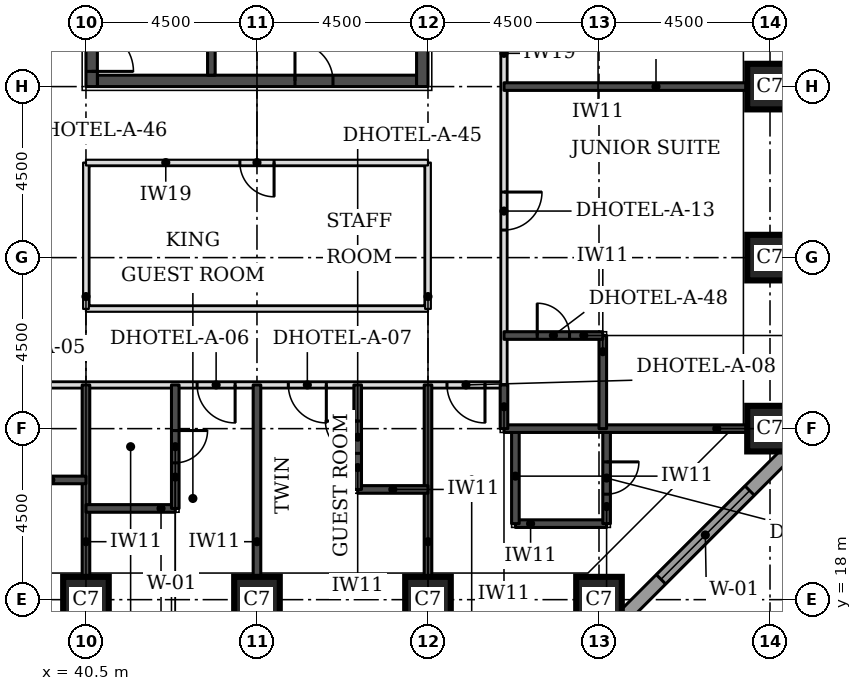
"""IFC4 building model, lengths in metres.
Left out: names, types, materials, properties, quantities, classifications, styles, units other than length and angle.
Written with IfcOpenShell. Run it as: python <this file> out.ifc"""

import sys

from ifc_helpers import new_model, si_unit, direction, frame, frame_2d, origin, origin_2d, place, context, subcontext, project, spatial, rectangle, extrude, element, fill, save


model = new_model("IFC4")
c1 = context("Model", 3, precision=1e-05, world=origin(), true_north=direction((0.0, 1.0)))
c2 = subcontext(c1, "Body", "Model", "MODEL_VIEW")
j1 = project(units=[si_unit("LENGTHUNIT", "METRE"), si_unit("PLANEANGLEUNIT", "RADIAN")], contexts=[c1])
p1 = place(None, origin())
s1 = spatial("IfcSite", under=j1, at=p1, CompositionType="ELEMENT")
p2 = place(p1, origin())
s2 = spatial("IfcBuilding", under=s1, at=p2, CompositionType="ELEMENT")
p3 = place(p2, frame((0.0, 0.0, 49.5)))
s3 = spatial("IfcBuildingStorey", under=s2, at=p3, CompositionType="ELEMENT", Elevation=49.5)
for number, where, z_axis, x_axis in (
    (1, (40.5, 18.0, 0.0), (0.0, 0.0, 1.0), (1.0, 0.0, 0.0)),
    (2, (45.0, 18.0, 0.0), (0.0, 0.0, 1.0), (1.0, 0.0, 0.0)),
    (3, (49.5, 18.0, 0.0), (0.0, 0.0, 1.0), (1.0, 0.0, 0.0)),
    (4, (54.0, 18.0, 0.0), (0.0, 0.0, 1.0), (1.0, 0.0, 0.0)),
    (5, (58.5, 22.5, 0.0), (0.0, 0.0, 1.0), (1.0, 0.0, 0.0)),
    (6, (58.5, 27.0, 0.0), (0.0, 0.0, 1.0), (1.0, 0.0, 0.0)),
    (7, (58.5, 31.5, 0.0), (0.0, 0.0, 1.0), (1.0, 0.0, 0.0)),
):
    element("IfcColumn", number, at=place(p3, frame(where, z_axis=z_axis, x_axis=x_axis)), inside=s3, PredefinedType="COLUMN", context=c2, shape_type="SweptSolid", body=[
        extrude(rectangle(XDim=1.2, YDim=1.2, at=origin_2d()), origin(), (0.0, 0.0, 1.0), 3.3),
    ])
p4 = place(p3, frame((40.8, 31.65, 0.0), z_axis=(0.0, 0.0, 1.0), x_axis=(1.0, 0.0, 0.0)))
e8 = element("IfcWall", 8, at=p4, inside=s3, PredefinedType="SHEAR", context=c2, shape_type="SweptSolid", body=[
    extrude(rectangle(XDim=8.4, YDim=0.3, at=frame_2d((4.2, 0.0))), origin(), (0.0, 0.0, 1.0), 3.3),
])
p5 = place(p4, frame((5.2, 0.0, 0.0)))
e9 = element("IfcOpeningElement", 9, at=p5, cuts=e8, PredefinedType="OPENING", context=c2, shape_type="SweptSolid", body=[
    extrude(rectangle(XDim=1.0, YDim=2.1, at=frame_2d((0.5, 1.05))), frame((0.0, 0.16, 0.0), z_axis=(0.0, -1.0, 0.0), x_axis=(1.0, 0.0, 0.0)), (0.0, 0.0, 1.0), 0.32),
])
p6 = place(p3, frame((40.65, 31.5, 0.0), z_axis=(0.0, 0.0, 1.0), x_axis=(0.0, 1.0, 0.0)))
e10 = element("IfcWall", 10, at=p6, inside=s3, PredefinedType="SHEAR", context=c2, shape_type="SweptSolid", body=[
    extrude(rectangle(XDim=9.0, YDim=0.3, at=frame_2d((4.5, 0.0))), origin(), (0.0, 0.0, 1.0), 3.3),
])
p7 = place(p6, frame((0.4, 0.0, 0.0)))
e11 = element("IfcOpeningElement", 11, at=p7, cuts=e10, PredefinedType="OPENING", context=c2, shape_type="SweptSolid", body=[
    extrude(rectangle(XDim=1.1, YDim=2.1, at=frame_2d((0.55, 1.05))), frame((0.0, 0.16, 0.0), z_axis=(0.0, -1.0, 0.0), x_axis=(1.0, 0.0, 0.0)), (0.0, 0.0, 1.0), 0.32),
])
p8 = place(p3, frame((49.35, 31.5, 0.0), z_axis=(0.0, 0.0, 1.0), x_axis=(0.0, 1.0, 0.0)))
e12 = element("IfcWall", 12, at=p8, inside=s3, PredefinedType="SHEAR", context=c2, shape_type="SweptSolid", body=[
    extrude(rectangle(XDim=9.0, YDim=0.3, at=frame_2d((4.5, 0.0))), origin(), (0.0, 0.0, 1.0), 3.3),
])
p9 = place(p3, frame((54.27, 17.174, 0.0), z_axis=(0.0, 0.0, 1.0), x_axis=(0.707106781187, 0.707106781187, 0.0)))
e13 = element("IfcWall", 13, at=p9, inside=s3, PredefinedType="STANDARD", context=c2, shape_type="SweptSolid", body=[
    extrude(rectangle(XDim=7.151, YDim=0.35, at=frame_2d((3.576, 0.0))), origin(), (0.0, 0.0, 1.0), 3.055),
])
p10 = place(p9, frame((1.926, 0.0, 0.8)))
e14 = element("IfcOpeningElement", 14, at=p10, cuts=e13, PredefinedType="OPENING", context=c2, shape_type="SweptSolid", body=[
    extrude(rectangle(XDim=3.3, YDim=1.5, at=frame_2d((1.65, 0.75))), frame((0.0, 0.185, 0.0), z_axis=(0.0, -1.0, 0.0), x_axis=(1.0, 0.0, 0.0)), (0.0, 0.0, 1.0), 0.37),
])
p11 = place(p3, frame((19.15, 23.65, 0.0), z_axis=(0.0, 0.0, 1.0), x_axis=(1.0, 0.0, 0.0)))
e15 = element("IfcWall", 15, at=p11, inside=s3, PredefinedType="PARTITIONING", context=c2, shape_type="SweptSolid", body=[
    extrude(rectangle(XDim=32.35, YDim=0.15, at=frame_2d((16.175, 0.0))), origin(), (0.0, 0.0, 1.0), 3.08),
])
p12 = place(p11, frame((6.275, 0.0, 0.0)))
e16 = element("IfcOpeningElement", 16, at=p12, cuts=e15, PredefinedType="OPENING", context=c2, shape_type="SweptSolid", body=[
    extrude(rectangle(XDim=1.0, YDim=2.1, at=frame_2d((0.5, 1.05))), frame((0.0, 0.085, 0.0), z_axis=(0.0, -1.0, 0.0), x_axis=(1.0, 0.0, 0.0)), (0.0, 0.0, 1.0), 0.17),
])
p13 = place(p11, frame((8.675, 0.0, 0.0)))
e17 = element("IfcOpeningElement", 17, at=p13, cuts=e15, PredefinedType="OPENING", context=c2, shape_type="SweptSolid", body=[
    extrude(rectangle(XDim=1.0, YDim=2.1, at=frame_2d((0.5, 1.05))), frame((0.0, 0.085, 0.0), z_axis=(0.0, -1.0, 0.0), x_axis=(1.0, 0.0, 0.0)), (0.0, 0.0, 1.0), 0.17),
])
p14 = place(p11, frame((15.25, 0.0, 0.0)))
e18 = element("IfcOpeningElement", 18, at=p14, cuts=e15, PredefinedType="OPENING", context=c2, shape_type="SweptSolid", body=[
    extrude(rectangle(XDim=1.0, YDim=2.1, at=frame_2d((0.5, 1.05))), frame((0.0, 0.085, 0.0), z_axis=(0.0, -1.0, 0.0), x_axis=(1.0, 0.0, 0.0)), (0.0, 0.0, 1.0), 0.17),
])
p15 = place(p11, frame((17.675, 0.0, 0.0)))
e19 = element("IfcOpeningElement", 19, at=p15, cuts=e15, PredefinedType="OPENING", context=c2, shape_type="SweptSolid", body=[
    extrude(rectangle(XDim=1.0, YDim=2.1, at=frame_2d((0.5, 1.05))), frame((0.0, 0.085, 0.0), z_axis=(0.0, -1.0, 0.0), x_axis=(1.0, 0.0, 0.0)), (0.0, 0.0, 1.0), 0.17),
])
p16 = place(p11, frame((24.275, 0.0, 0.0)))
e20 = element("IfcOpeningElement", 20, at=p16, cuts=e15, PredefinedType="OPENING", context=c2, shape_type="SweptSolid", body=[
    extrude(rectangle(XDim=1.0, YDim=2.1, at=frame_2d((0.5, 1.05))), frame((0.0, 0.085, 0.0), z_axis=(0.0, -1.0, 0.0), x_axis=(1.0, 0.0, 0.0)), (0.0, 0.0, 1.0), 0.17),
])
p17 = place(p11, frame((26.675, 0.0, 0.0)))
e21 = element("IfcOpeningElement", 21, at=p17, cuts=e15, PredefinedType="OPENING", context=c2, shape_type="SweptSolid", body=[
    extrude(rectangle(XDim=1.0, YDim=2.1, at=frame_2d((0.5, 1.05))), frame((0.0, 0.085, 0.0), z_axis=(0.0, -1.0, 0.0), x_axis=(1.0, 0.0, 0.0)), (0.0, 0.0, 1.0), 0.17),
])
p18 = place(p11, frame((1.175, 0.0, 0.0)))
e22 = element("IfcOpeningElement", 22, at=p18, cuts=e15, PredefinedType="OPENING", context=c2, shape_type="SweptSolid", body=[
    extrude(rectangle(XDim=1.0, YDim=2.1, at=frame_2d((0.5, 1.05))), frame((0.0, 0.085, 0.0), z_axis=(0.0, -1.0, 0.0), x_axis=(1.0, 0.0, 0.0)), (0.0, 0.0, 1.0), 0.17),
])
p19 = place(p11, frame((30.85, 0.0, 0.0)))
e23 = element("IfcOpeningElement", 23, at=p19, cuts=e15, PredefinedType="OPENING", context=c2, shape_type="SweptSolid", body=[
    extrude(rectangle(XDim=1.0, YDim=2.1, at=frame_2d((0.5, 1.05))), frame((0.0, 0.085, 0.0), z_axis=(0.0, -1.0, 0.0), x_axis=(1.0, 0.0, 0.0)), (0.0, 0.0, 1.0), 0.17),
])
p20 = place(p3, frame((51.5, 23.65, 0.0), z_axis=(0.0, 0.0, 1.0), x_axis=(0.0, 1.0, 0.0)))
e24 = element("IfcWall", 24, at=p20, inside=s3, PredefinedType="PARTITIONING", context=c2, shape_type="SweptSolid", body=[
    extrude(rectangle(XDim=23.85, YDim=0.15, at=frame_2d((11.925, 0.0))), origin(), (0.0, 0.0, 1.0), 3.08),
])
p21 = place(p20, frame((4.075, 0.0, 0.0)))
e25 = element("IfcOpeningElement", 25, at=p21, cuts=e24, PredefinedType="OPENING", context=c2, shape_type="SweptSolid", body=[
    extrude(rectangle(XDim=1.0, YDim=2.1, at=frame_2d((0.5, 1.05))), frame((0.0, 0.085, 0.0), z_axis=(0.0, -1.0, 0.0), x_axis=(1.0, 0.0, 0.0)), (0.0, 0.0, 1.0), 0.17),
])
p22 = place(p20, frame((10.375, 0.0, 0.0)))
e26 = element("IfcOpeningElement", 26, at=p22, cuts=e24, PredefinedType="OPENING", context=c2, shape_type="SweptSolid", body=[
    extrude(rectangle(XDim=1.0, YDim=2.1, at=frame_2d((0.5, 1.05))), frame((0.0, 0.085, 0.0), z_axis=(0.0, -1.0, 0.0), x_axis=(1.0, 0.0, 0.0)), (0.0, 0.0, 1.0), 0.17),
])
p23 = place(p20, frame((19.9, 0.0, 0.0)))
e27 = element("IfcOpeningElement", 27, at=p23, cuts=e24, PredefinedType="OPENING", context=c2, shape_type="SweptSolid", body=[
    extrude(rectangle(XDim=0.9, YDim=2.1, at=frame_2d((0.45, 1.05))), frame((0.0, 0.085, 0.0), z_axis=(0.0, -1.0, 0.0), x_axis=(1.0, 0.0, 0.0)), (0.0, 0.0, 1.0), 0.17),
])
p24 = place(p3, frame((40.5, 25.65, 0.0), z_axis=(0.0, 0.0, 1.0), x_axis=(1.0, 0.0, 0.0)))
e28 = element("IfcWall", 28, at=p24, inside=s3, PredefinedType="PARTITIONING", context=c2, shape_type="SweptSolid", body=[
    extrude(rectangle(XDim=9.0, YDim=0.15, at=frame_2d((4.5, 0.0))), origin(), (0.0, 0.0, 1.0), 3.08),
])
for number, where, z_axis, x_axis in (
    (29, (40.5, 25.65, 0.0), (0.0, 0.0, 1.0), (0.0, 1.0, 0.0)),
    (30, (49.5, 25.65, 0.0), (0.0, 0.0, 1.0), (0.0, 1.0, 0.0)),
):
    element("IfcWall", number, at=place(p3, frame(where, z_axis=z_axis, x_axis=x_axis)), inside=s3, PredefinedType="PARTITIONING", context=c2, shape_type="SweptSolid", body=[
        extrude(rectangle(XDim=3.85, YDim=0.15, at=frame_2d((1.925, 0.0))), origin(), (0.0, 0.0, 1.0), 3.08),
    ])
p25 = place(p3, frame((40.5, 29.5, 0.0), z_axis=(0.0, 0.0, 1.0), x_axis=(1.0, 0.0, 0.0)))
e31 = element("IfcWall", 31, at=p25, inside=s3, PredefinedType="PARTITIONING", context=c2, shape_type="SweptSolid", body=[
    extrude(rectangle(XDim=9.0, YDim=0.15, at=frame_2d((4.5, 0.0))), origin(), (0.0, 0.0, 1.0), 3.08),
])
p26 = place(p25, frame((4.05, 0.0, 0.0)))
e32 = element("IfcOpeningElement", 32, at=p26, cuts=e31, PredefinedType="OPENING", context=c2, shape_type="SweptSolid", body=[
    extrude(rectangle(XDim=0.9, YDim=2.1, at=frame_2d((0.45, 1.05))), frame((0.0, 0.085, 0.0), z_axis=(0.0, -1.0, 0.0), x_axis=(1.0, 0.0, 0.0)), (0.0, 0.0, 1.0), 0.17),
])
for number, where, z_axis, x_axis in (
    (33, (40.5, 18.6, 0.0), (0.0, 0.0, 1.0), (0.0, 1.0, 0.0)),
    (34, (45.0, 18.6, 0.0), (0.0, 0.0, 1.0), (0.0, 1.0, 0.0)),
    (35, (49.5, 18.6, 0.0), (0.0, 0.0, 1.0), (0.0, 1.0, 0.0)),
):
    element("IfcWall", number, at=place(p3, frame(where, z_axis=z_axis, x_axis=x_axis)), inside=s3, PredefinedType="SOLIDWALL", context=c2, shape_type="SweptSolid", body=[
        extrude(rectangle(XDim=5.05, YDim=0.2, at=frame_2d((2.525, 0.0))), origin(), (0.0, 0.0, 1.0), 3.08),
    ])
p27 = place(p3, frame((51.8, 20.0, 0.0), z_axis=(0.0, 0.0, 1.0), x_axis=(1.0, 0.0, 0.0)))
e36 = element("IfcWall", 36, at=p27, inside=s3, PredefinedType="SOLIDWALL", context=c2, shape_type="SweptSolid", body=[
    extrude(rectangle(XDim=2.4, YDim=0.2, at=frame_2d((1.2, 0.0))), origin(), (0.0, 0.0, 1.0), 3.08),
])
p28 = place(p3, frame((51.8, 20.0, 0.0), z_axis=(0.0, 0.0, 1.0), x_axis=(0.0, 1.0, 0.0)))
e37 = element("IfcWall", 37, at=p28, inside=s3, PredefinedType="SOLIDWALL", context=c2, shape_type="SweptSolid", body=[
    extrude(rectangle(XDim=2.5, YDim=0.2, at=frame_2d((1.25, 0.0))), origin(), (0.0, 0.0, 1.0), 3.08),
])
p29 = place(p3, frame((54.2, 20.0, 0.0), z_axis=(0.0, 0.0, 1.0), x_axis=(0.0, 1.0, 0.0)))
e38 = element("IfcWall", 38, at=p29, inside=s3, PredefinedType="SOLIDWALL", context=c2, shape_type="SweptSolid", body=[
    extrude(rectangle(XDim=2.5, YDim=0.2, at=frame_2d((1.25, 0.0))), origin(), (0.0, 0.0, 1.0), 3.08),
])
p30 = place(p29, frame((0.775, 0.0, 0.0)))
e39 = element("IfcOpeningElement", 39, at=p30, cuts=e38, PredefinedType="OPENING", context=c2, shape_type="SweptSolid", body=[
    extrude(rectangle(XDim=0.85, YDim=2.1, at=frame_2d((0.425, 1.05))), frame((0.0, 0.11, 0.0), z_axis=(0.0, -1.0, 0.0), x_axis=(1.0, 0.0, 0.0)), (0.0, 0.0, 1.0), 0.22),
])
p31 = place(p3, frame((40.5, 20.4, 0.0), z_axis=(0.0, 0.0, 1.0), x_axis=(1.0, 0.0, 0.0)))
e40 = element("IfcWall", 40, at=p31, inside=s3, PredefinedType="SOLIDWALL", context=c2, shape_type="SweptSolid", body=[
    extrude(rectangle(XDim=2.35, YDim=0.2, at=frame_2d((1.175, 0.0))), origin(), (0.0, 0.0, 1.0), 3.08),
])
p32 = place(p3, frame((42.85, 20.4, 0.0), z_axis=(0.0, 0.0, 1.0), x_axis=(0.0, 1.0, 0.0)))
e41 = element("IfcWall", 41, at=p32, inside=s3, PredefinedType="SOLIDWALL", context=c2, shape_type="SweptSolid", body=[
    extrude(rectangle(XDim=3.25, YDim=0.2, at=frame_2d((1.625, 0.0))), origin(), (0.0, 0.0, 1.0), 3.08),
])
p33 = place(p32, frame((1.2, 0.0, 0.0)))
e42 = element("IfcOpeningElement", 42, at=p33, cuts=e41, PredefinedType="OPENING", context=c2, shape_type="SweptSolid", body=[
    extrude(rectangle(XDim=0.85, YDim=2.1, at=frame_2d((0.425, 1.05))), frame((0.0, 0.11, 0.0), z_axis=(0.0, -1.0, 0.0), x_axis=(1.0, 0.0, 0.0)), (0.0, 0.0, 1.0), 0.22),
])
p34 = place(p3, frame((47.65, 20.9, 0.0), z_axis=(0.0, 0.0, 1.0), x_axis=(1.0, 0.0, 0.0)))
e43 = element("IfcWall", 43, at=p34, inside=s3, PredefinedType="SOLIDWALL", context=c2, shape_type="SweptSolid", body=[
    extrude(rectangle(XDim=1.85, YDim=0.2, at=frame_2d((0.925, 0.0))), origin(), (0.0, 0.0, 1.0), 3.08),
])
p35 = place(p3, frame((47.65, 20.9, 0.0), z_axis=(0.0, 0.0, 1.0), x_axis=(0.0, 1.0, 0.0)))
e44 = element("IfcWall", 44, at=p35, inside=s3, PredefinedType="SOLIDWALL", context=c2, shape_type="SweptSolid", body=[
    extrude(rectangle(XDim=2.75, YDim=0.2, at=frame_2d((1.375, 0.0))), origin(), (0.0, 0.0, 1.0), 3.08),
])
p36 = place(p35, frame((0.95, 0.0, 0.0)))
e45 = element("IfcOpeningElement", 45, at=p36, cuts=e44, PredefinedType="OPENING", context=c2, shape_type="SweptSolid", body=[
    extrude(rectangle(XDim=0.85, YDim=2.1, at=frame_2d((0.425, 1.05))), frame((0.0, 0.11, 0.0), z_axis=(0.0, -1.0, 0.0), x_axis=(1.0, 0.0, 0.0)), (0.0, 0.0, 1.0), 0.22),
])
p37 = place(p3, frame((38.65, 21.15, 0.0), z_axis=(0.0, 0.0, 1.0), x_axis=(1.0, 0.0, 0.0)))
e46 = element("IfcWall", 46, at=p37, inside=s3, PredefinedType="SOLIDWALL", context=c2, shape_type="SweptSolid", body=[
    extrude(rectangle(XDim=1.85, YDim=0.2, at=frame_2d((0.925, 0.0))), origin(), (0.0, 0.0, 1.0), 3.08),
])
p38 = place(p3, frame((51.5, 22.5, 0.0), z_axis=(0.0, 0.0, 1.0), x_axis=(1.0, 0.0, 0.0)))
e47 = element("IfcWall", 47, at=p38, inside=s3, PredefinedType="SOLIDWALL", context=c2, shape_type="SweptSolid", body=[
    extrude(rectangle(XDim=6.4, YDim=0.2, at=frame_2d((3.2, 0.0))), origin(), (0.0, 0.0, 1.0), 3.08),
])
p39 = place(p3, frame((51.5, 22.5, 0.0), z_axis=(0.0, 0.0, 1.0), x_axis=(0.0, 1.0, 0.0)))
e48 = element("IfcWall", 48, at=p39, inside=s3, PredefinedType="SOLIDWALL", context=c2, shape_type="SweptSolid", body=[
    extrude(rectangle(XDim=1.15, YDim=0.2, at=frame_2d((0.575, 0.0))), origin(), (0.0, 0.0, 1.0), 3.08),
])
p40 = place(p3, frame((54.1, 22.5, 0.0), z_axis=(0.0, 0.0, 1.0), x_axis=(0.0, 1.0, 0.0)))
e49 = element("IfcWall", 49, at=p40, inside=s3, PredefinedType="SOLIDWALL", context=c2, shape_type="SweptSolid", body=[
    extrude(rectangle(XDim=2.45, YDim=0.2, at=frame_2d((1.225, 0.0))), origin(), (0.0, 0.0, 1.0), 3.08),
])
p41 = place(p3, frame((51.5, 24.95, 0.0), z_axis=(0.0, 0.0, 1.0), x_axis=(1.0, 0.0, 0.0)))
e50 = element("IfcWall", 50, at=p41, inside=s3, PredefinedType="SOLIDWALL", context=c2, shape_type="SweptSolid", body=[
    extrude(rectangle(XDim=2.6, YDim=0.2, at=frame_2d((1.3, 0.0))), origin(), (0.0, 0.0, 1.0), 3.08),
])
p42 = place(p41, frame((0.875, 0.0, 0.0)))
e51 = element("IfcOpeningElement", 51, at=p42, cuts=e50, PredefinedType="OPENING", context=c2, shape_type="SweptSolid", body=[
    extrude(rectangle(XDim=0.85, YDim=2.1, at=frame_2d((0.425, 1.05))), frame((0.0, 0.11, 0.0), z_axis=(0.0, -1.0, 0.0), x_axis=(1.0, 0.0, 0.0)), (0.0, 0.0, 1.0), 0.22),
])
p43 = place(p3, frame((51.5, 31.5, 0.0), z_axis=(0.0, 0.0, 1.0), x_axis=(1.0, 0.0, 0.0)))
e52 = element("IfcWall", 52, at=p43, inside=s3, PredefinedType="SOLIDWALL", context=c2, shape_type="SweptSolid", body=[
    extrude(rectangle(XDim=6.4, YDim=0.2, at=frame_2d((3.2, 0.0))), origin(), (0.0, 0.0, 1.0), 3.08),
])
p44 = place(p3, frame((43.8, 31.8, 0.0), z_axis=(0.0, 0.0, 1.0), x_axis=(0.0, 1.0, 0.0)))
e53 = element("IfcWall", 53, at=p44, inside=s3, PredefinedType="SOLIDWALL", context=c2, shape_type="SweptSolid", body=[
    extrude(rectangle(XDim=5.7, YDim=0.2, at=frame_2d((2.85, 0.0))), origin(), (0.0, 0.0, 1.0), 3.08),
])
p45 = place(p10, origin())
e54 = element("IfcWindow", 54, at=p45, inside=s3, PartitioningType="SINGLE_PANEL", PredefinedType="WINDOW", context=c2, shape_type="SweptSolid", body=[
    extrude(rectangle(XDim=3.3, YDim=1.5, at=frame_2d((1.65, 0.75))), frame((0.0, 0.085, 0.0), z_axis=(0.0, -1.0, 0.0), x_axis=(1.0, 0.0, 0.0)), (0.0, 0.0, 1.0), 0.06),
])
fill(e14, e54)
p46 = place(p16, frame((1.0, 0.0, 0.0), z_axis=(0.0, 0.0, 1.0), x_axis=(-1.0, 0.0, 0.0)))
e55 = element("IfcDoor", 55, at=p46, inside=s3, OperationType="SINGLE_SWING_LEFT", PredefinedType="DOOR", context=c2, shape_type="SweptSolid", body=[
    extrude(rectangle(XDim=1.0, YDim=2.1, at=frame_2d((0.5, 1.05))), frame((0.0, 0.025, 0.0), z_axis=(0.0, -1.0, 0.0), x_axis=(1.0, 0.0, 0.0)), (0.0, 0.0, 1.0), 0.05),
])
fill(e20, e55)
p47 = place(p33, frame((0.85, 0.0, 0.0), z_axis=(0.0, 0.0, 1.0), x_axis=(-1.0, 0.0, 0.0)))
e56 = element("IfcDoor", 56, at=p47, inside=s3, OperationType="SINGLE_SWING_LEFT", PredefinedType="DOOR", context=c2, shape_type="SweptSolid", body=[
    extrude(rectangle(XDim=0.85, YDim=2.1, at=frame_2d((0.425, 1.05))), frame((0.0, 0.025, 0.0), z_axis=(0.0, -1.0, 0.0), x_axis=(1.0, 0.0, 0.0)), (0.0, 0.0, 1.0), 0.05),
])
fill(e42, e56)
p48 = place(p17, frame((1.0, 0.0, 0.0), z_axis=(0.0, 0.0, 1.0), x_axis=(-1.0, 0.0, 0.0)))
e57 = element("IfcDoor", 57, at=p48, inside=s3, OperationType="SINGLE_SWING_LEFT", PredefinedType="DOOR", context=c2, shape_type="SweptSolid", body=[
    extrude(rectangle(XDim=1.0, YDim=2.1, at=frame_2d((0.5, 1.05))), frame((0.0, 0.025, 0.0), z_axis=(0.0, -1.0, 0.0), x_axis=(1.0, 0.0, 0.0)), (0.0, 0.0, 1.0), 0.05),
])
fill(e21, e57)
p49 = place(p36, origin())
e58 = element("IfcDoor", 58, at=p49, inside=s3, OperationType="SINGLE_SWING_RIGHT", PredefinedType="DOOR", context=c2, shape_type="SweptSolid", body=[
    extrude(rectangle(XDim=0.85, YDim=2.1, at=frame_2d((0.425, 1.05))), frame((0.0, 0.025, 0.0), z_axis=(0.0, -1.0, 0.0), x_axis=(1.0, 0.0, 0.0)), (0.0, 0.0, 1.0), 0.05),
])
fill(e45, e58)
p50 = place(p21, frame((1.0, 0.0, 0.0), z_axis=(0.0, 0.0, 1.0), x_axis=(-1.0, 0.0, 0.0)))
e59 = element("IfcDoor", 59, at=p50, inside=s3, OperationType="SINGLE_SWING_LEFT", PredefinedType="DOOR", context=c2, shape_type="SweptSolid", body=[
    extrude(rectangle(XDim=1.0, YDim=2.1, at=frame_2d((0.5, 1.05))), frame((0.0, 0.025, 0.0), z_axis=(0.0, -1.0, 0.0), x_axis=(1.0, 0.0, 0.0)), (0.0, 0.0, 1.0), 0.05),
])
fill(e25, e59)
p51 = place(p42, origin())
e60 = element("IfcDoor", 60, at=p51, inside=s3, OperationType="SINGLE_SWING_LEFT", PredefinedType="DOOR", context=c2, shape_type="SweptSolid", body=[
    extrude(rectangle(XDim=0.85, YDim=2.1, at=frame_2d((0.425, 1.05))), frame((0.0, 0.025, 0.0), z_axis=(0.0, -1.0, 0.0), x_axis=(1.0, 0.0, 0.0)), (0.0, 0.0, 1.0), 0.05),
])
fill(e51, e60)
p52 = place(p19, frame((1.0, 0.0, 0.0), z_axis=(0.0, 0.0, 1.0), x_axis=(-1.0, 0.0, 0.0)))
e61 = element("IfcDoor", 61, at=p52, inside=s3, OperationType="SINGLE_SWING_LEFT", PredefinedType="DOOR", context=c2, shape_type="SweptSolid", body=[
    extrude(rectangle(XDim=1.0, YDim=2.1, at=frame_2d((0.5, 1.05))), frame((0.0, 0.025, 0.0), z_axis=(0.0, -1.0, 0.0), x_axis=(1.0, 0.0, 0.0)), (0.0, 0.0, 1.0), 0.05),
])
fill(e23, e61)
p53 = place(p30, frame((0.85, 0.0, 0.0), z_axis=(0.0, 0.0, 1.0), x_axis=(-1.0, 0.0, 0.0)))
e62 = element("IfcDoor", 62, at=p53, inside=s3, OperationType="SINGLE_SWING_LEFT", PredefinedType="DOOR", context=c2, shape_type="SweptSolid", body=[
    extrude(rectangle(XDim=0.85, YDim=2.1, at=frame_2d((0.425, 1.05))), frame((0.0, 0.025, 0.0), z_axis=(0.0, -1.0, 0.0), x_axis=(1.0, 0.0, 0.0)), (0.0, 0.0, 1.0), 0.05),
])
fill(e39, e62)
p54 = place(p26, frame((0.9, 0.0, 0.0), z_axis=(0.0, 0.0, 1.0), x_axis=(-1.0, 0.0, 0.0)))
e63 = element("IfcDoor", 63, at=p54, inside=s3, OperationType="SINGLE_SWING_LEFT", PredefinedType="DOOR", context=c2, shape_type="SweptSolid", body=[
    extrude(rectangle(XDim=0.9, YDim=2.1, at=frame_2d((0.45, 1.05))), frame((0.0, 0.025, 0.0), z_axis=(0.0, -1.0, 0.0), x_axis=(1.0, 0.0, 0.0)), (0.0, 0.0, 1.0), 0.05),
])
fill(e32, e63)
p55 = place(p7, frame((1.1, 0.0, 0.0), z_axis=(0.0, 0.0, 1.0), x_axis=(-1.0, 0.0, 0.0)))
e64 = element("IfcDoor", 64, at=p55, inside=s3, OperationType="SINGLE_SWING_RIGHT", PredefinedType="DOOR", context=c2, shape_type="SweptSolid", body=[
    extrude(rectangle(XDim=1.1, YDim=2.1, at=frame_2d((0.55, 1.05))), frame((0.0, 0.025, 0.0), z_axis=(0.0, -1.0, 0.0), x_axis=(1.0, 0.0, 0.0)), (0.0, 0.0, 1.0), 0.05),
])
fill(e11, e64)
p56 = place(p5, origin())
e65 = element("IfcDoor", 65, at=p56, inside=s3, OperationType="SINGLE_SWING_LEFT", PredefinedType="DOOR", context=c2, shape_type="SweptSolid", body=[
    extrude(rectangle(XDim=1.0, YDim=2.1, at=frame_2d((0.5, 1.05))), frame((0.0, 0.025, 0.0), z_axis=(0.0, -1.0, 0.0), x_axis=(1.0, 0.0, 0.0)), (0.0, 0.0, 1.0), 0.05),
])
fill(e9, e65)
save(model, sys.argv[1])
